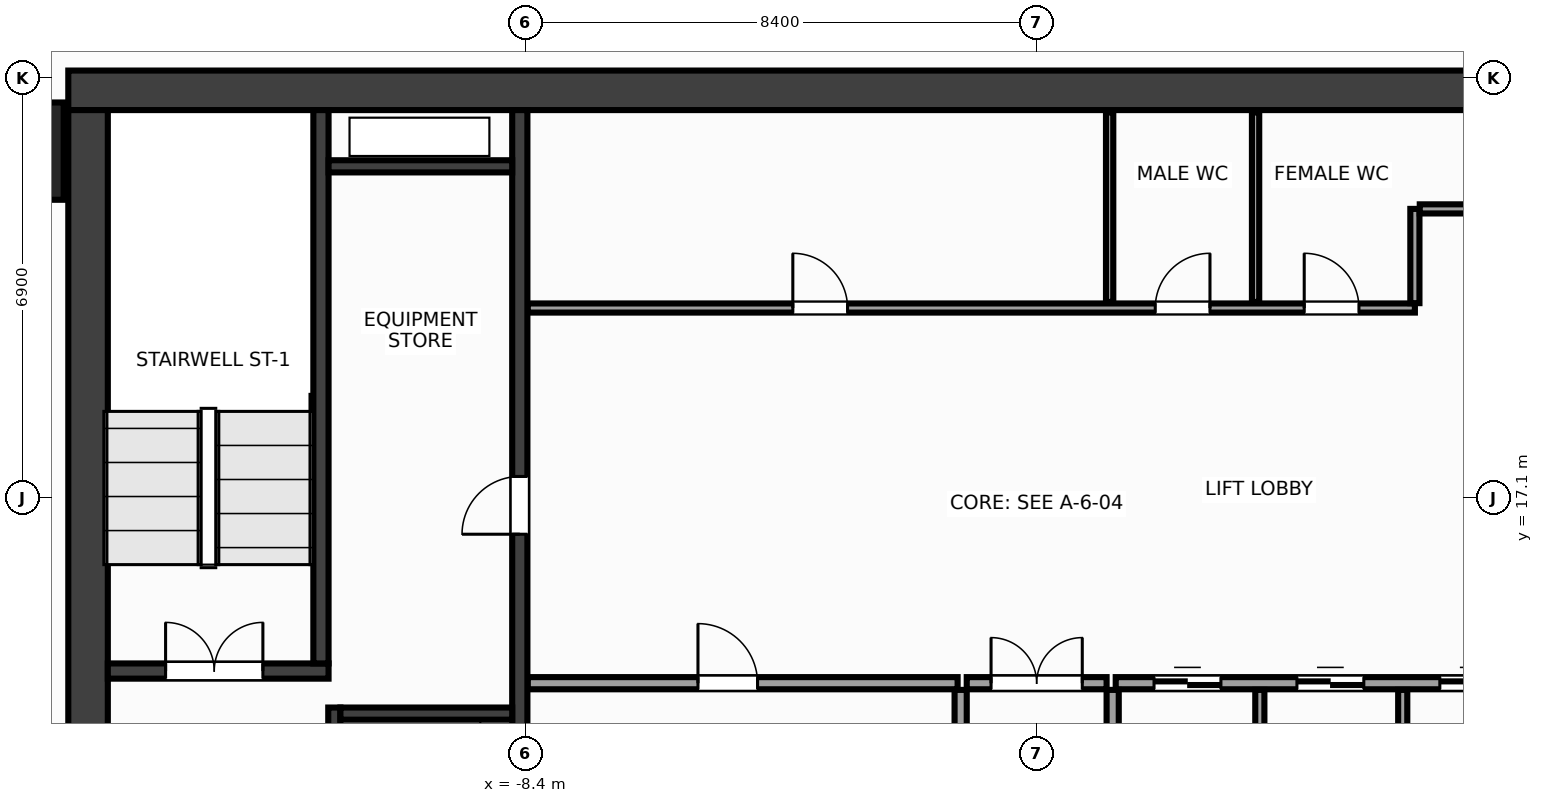
"""IFC4 building model, lengths in metres.
Left out: names, types, materials, properties, quantities, classifications, styles, units other than length and angle.
Written with IfcOpenShell. Run it as: python <this file> out.ifc"""

import sys

from ifc_helpers import new_model, si_unit, direction, frame, frame_2d, origin, origin_2d, place, context, subcontext, project, spatial, rectangle, extrude, source, transform, mapped, element, fill, save


model = new_model("IFC4")
c1 = context("Model", 3, precision=1e-05, world=origin(), true_north=direction((0.0, 1.0)))
c2 = subcontext(c1, "Body", "Model", "MODEL_VIEW")
j1 = project(units=[si_unit("LENGTHUNIT", "METRE"), si_unit("PLANEANGLEUNIT", "RADIAN")], contexts=[c1])
p1 = place(None, origin())
s1 = spatial("IfcSite", under=j1, at=p1, CompositionType="ELEMENT")
p2 = place(p1, origin())
s2 = spatial("IfcBuilding", under=s1, at=p2, CompositionType="ELEMENT")
p3 = place(p2, frame((0.0, 0.0, 84.8)))
s3 = spatial("IfcBuildingStorey", under=s2, at=p3, CompositionType="ELEMENT", Elevation=84.8)
m1 = source(origin(), c2, "Body", "SweptSolid", [
    extrude(rectangle(XDim=31.85, YDim=0.65, at=frame_2d((15.925, 0.0))), origin(), (0.0, 0.0, 1.0), 3.6),
])
p4 = place(p3, frame((-15.925, 23.8, 0.0), z_axis=(0.0, 0.0, 1.0), x_axis=(1.0, 0.0, 0.0)))
e1 = element("IfcWall", 1, at=p4, inside=s3, PredefinedType="SHEAR", context=c2, shape_type="MappedRepresentation", body=[
    mapped(m1, transform((0.0, 0.0, 0.0), x_axis=(1.0, 0.0, 0.0), y_axis=(0.0, 1.0, 0.0), z_axis=(0.0, 0.0, 1.0), scale=1.0)),
])
m2 = source(origin(), c2, "Body", "SweptSolid", [
    extrude(rectangle(XDim=12.95, YDim=0.65, at=frame_2d((6.475, 0.0))), origin(), (0.0, 0.0, 1.0), 3.6),
])
p5 = place(p3, frame((-15.6, 10.525, 0.0), z_axis=(0.0, 0.0, 1.0), x_axis=(0.0, 1.0, 0.0)))
e2 = element("IfcWall", 2, at=p5, inside=s3, PredefinedType="SHEAR", context=c2, shape_type="MappedRepresentation", body=[
    mapped(m2, transform((0.0, 0.0, 0.0), x_axis=(1.0, 0.0, 0.0), y_axis=(0.0, 1.0, 0.0), z_axis=(0.0, 0.0, 1.0), scale=1.0)),
])
m3 = source(origin(), c2, "Body", "SweptSolid", [
    extrude(rectangle(XDim=12.95, YDim=0.25, at=frame_2d((6.475, 0.0))), origin(), (0.0, 0.0, 1.0), 3.6),
])
p6 = place(p3, frame((-8.5, 10.525, 0.0), z_axis=(0.0, 0.0, 1.0), x_axis=(0.0, 1.0, 0.0)))
e3 = element("IfcWall", 3, at=p6, inside=s3, PredefinedType="SHEAR", context=c2, shape_type="MappedRepresentation", body=[
    mapped(m3, transform((0.0, 0.0, 0.0), x_axis=(1.0, 0.0, 0.0), y_axis=(0.0, 1.0, 0.0), z_axis=(0.0, 0.0, 1.0), scale=1.0)),
])
p7 = place(p6, frame((5.975, 0.0, 0.0)))
e4 = element("IfcOpeningElement", 4, at=p7, cuts=e3, PredefinedType="OPENING", context=c2, shape_type="SweptSolid", body=[
    extrude(rectangle(XDim=0.95, YDim=2.15, at=frame_2d((0.475, 1.075))), frame((0.0, 0.137, 0.0), z_axis=(0.0, -1.0, 0.0), x_axis=(1.0, 0.0, 0.0)), (0.0, 0.0, 1.0), 0.274),
])
m4 = source(origin(), c2, "Body", "SweptSolid", [
    extrude(rectangle(XDim=3.63, YDim=0.25, at=frame_2d((1.815, 0.0))), origin(), (0.0, 0.0, 1.0), 3.6),
])
p8 = place(p3, frame((-15.275, 14.25, 0.0), z_axis=(0.0, 0.0, 1.0), x_axis=(1.0, 0.0, 0.0)))
e5 = element("IfcWall", 5, at=p8, inside=s3, PredefinedType="SHEAR", context=c2, shape_type="MappedRepresentation", body=[
    mapped(m4, transform((0.0, 0.0, 0.0), x_axis=(1.0, 0.0, 0.0), y_axis=(0.0, 1.0, 0.0), z_axis=(0.0, 0.0, 1.0), scale=1.0)),
])
p9 = place(p8, frame((0.95, 0.0, 0.0)))
e6 = element("IfcOpeningElement", 6, at=p9, cuts=e5, PredefinedType="OPENING", context=c2, shape_type="SweptSolid", body=[
    extrude(rectangle(XDim=1.6, YDim=2.15, at=frame_2d((0.8, 1.075))), frame((0.0, 0.137, 0.0), z_axis=(0.0, -1.0, 0.0), x_axis=(1.0, 0.0, 0.0)), (0.0, 0.0, 1.0), 0.274),
])
m5 = source(origin(), c2, "Body", "SweptSolid", [
    extrude(rectangle(XDim=9.1, YDim=0.25, at=frame_2d((4.55, 0.0))), origin(), (0.0, 0.0, 1.0), 3.6),
])
p10 = place(p3, frame((-11.77, 14.375, 0.0), z_axis=(0.0, 0.0, 1.0), x_axis=(0.0, 1.0, 0.0)))
e7 = element("IfcWall", 7, at=p10, inside=s3, PredefinedType="SHEAR", context=c2, shape_type="MappedRepresentation", body=[
    mapped(m5, transform((0.0, 0.0, 0.0), x_axis=(1.0, 0.0, 0.0), y_axis=(0.0, 1.0, 0.0), z_axis=(0.0, 0.0, 1.0), scale=1.0)),
])
m6 = source(origin(), c2, "Body", "SweptSolid", [
    extrude(rectangle(XDim=3.125, YDim=0.2, at=frame_2d((1.562, 0.0))), origin(), (0.0, 0.0, 1.0), 3.6),
])
p11 = place(p3, frame((-11.55, 10.525, 0.0), z_axis=(0.0, 0.0, 1.0), x_axis=(0.0, 1.0, 0.0)))
e8 = element("IfcWall", 8, at=p11, inside=s3, PredefinedType="SHEAR", context=c2, shape_type="MappedRepresentation", body=[
    mapped(m6, transform((0.0, 0.0, 0.0), x_axis=(1.0, 0.0, 0.0), y_axis=(0.0, 1.0, 0.0), z_axis=(0.0, 0.0, 1.0), scale=1.0)),
])
p12 = place(p11, frame((0.9, 0.0, 0.0)))
e9 = element("IfcOpeningElement", 9, at=p12, cuts=e8, PredefinedType="OPENING", context=c2, shape_type="SweptSolid", body=[
    extrude(rectangle(XDim=1.1, YDim=2.15, at=frame_2d((0.55, 1.075))), frame((0.0, 0.112, 0.0), z_axis=(0.0, -1.0, 0.0), x_axis=(1.0, 0.0, 0.0)), (0.0, 0.0, 1.0), 0.224),
])
m7 = source(origin(), c2, "Body", "SweptSolid", [
    extrude(rectangle(XDim=2.825, YDim=0.2, at=frame_2d((1.413, 0.0))), origin(), (0.0, 0.0, 1.0), 3.6),
])
p13 = place(p3, frame((-11.45, 13.55, 0.0), z_axis=(0.0, 0.0, 1.0), x_axis=(1.0, 0.0, 0.0)))
e10 = element("IfcWall", 10, at=p13, inside=s3, PredefinedType="SHEAR", context=c2, shape_type="MappedRepresentation", body=[
    mapped(m7, transform((0.0, 0.0, 0.0), x_axis=(1.0, 0.0, 0.0), y_axis=(0.0, 1.0, 0.0), z_axis=(0.0, 0.0, 1.0), scale=1.0)),
])
m8 = source(origin(), c2, "Body", "SweptSolid", [
    extrude(rectangle(XDim=3.02, YDim=0.2, at=frame_2d((1.51, 0.0))), origin(), (0.0, 0.0, 1.0), 3.6),
])
p14 = place(p3, frame((-11.645, 22.55, 0.0), z_axis=(0.0, 0.0, 1.0), x_axis=(1.0, 0.0, 0.0)))
e11 = element("IfcWall", 11, at=p14, inside=s3, PredefinedType="SHEAR", context=c2, shape_type="MappedRepresentation", body=[
    mapped(m8, transform((0.0, 0.0, 0.0), x_axis=(1.0, 0.0, 0.0), y_axis=(0.0, 1.0, 0.0), z_axis=(0.0, 0.0, 1.0), scale=1.0)),
])
m9 = source(origin(), c2, "Body", "SweptSolid", [
    extrude(rectangle(XDim=1.6, YDim=1.6, at=origin_2d()), origin(), (0.0, 0.0, 1.0), 3.6),
])
p15 = place(p3, frame((-16.8, 22.8, 0.0), z_axis=(0.0, 0.0, 1.0), x_axis=(1.0, 0.0, 0.0)))
e12 = element("IfcColumn", 12, at=p15, inside=s3, PredefinedType="COLUMN", context=c2, shape_type="MappedRepresentation", body=[
    mapped(m9, transform((0.0, 0.0, 0.0), x_axis=(1.0, 0.0, 0.0), y_axis=(0.0, 1.0, 0.0), z_axis=(0.0, 0.0, 1.0), scale=1.0)),
])
m10 = source(origin(), c2, "Body", "SweptSolid", [
    extrude(rectangle(XDim=7.07, YDim=0.2, at=frame_2d((3.535, 0.0))), origin(), (0.0, 0.0, 1.0), 3.36),
])
p16 = place(p3, frame((-8.37, 14.05, 0.0), z_axis=(0.0, 0.0, 1.0), x_axis=(1.0, 0.0, 0.0)))
e13 = element("IfcWall", 13, at=p16, inside=s3, PredefinedType="PARTITIONING", context=c2, shape_type="MappedRepresentation", body=[
    mapped(m10, transform((0.0, 0.0, 0.0), x_axis=(1.0, 0.0, 0.0), y_axis=(0.0, 1.0, 0.0), z_axis=(0.0, 0.0, 1.0), scale=1.0)),
])
p17 = place(p16, frame((2.8, 0.0, 0.0)))
e14 = element("IfcOpeningElement", 14, at=p17, cuts=e13, PredefinedType="OPENING", context=c2, shape_type="SweptSolid", body=[
    extrude(rectangle(XDim=0.98, YDim=2.15, at=frame_2d((0.49, 1.075))), frame((0.0, 0.112, 0.0), z_axis=(0.0, -1.0, 0.0), x_axis=(1.0, 0.0, 0.0)), (0.0, 0.0, 1.0), 0.224),
])
p18 = place(p3, frame((1.3, 14.05, 0.0), z_axis=(0.0, 0.0, 1.0), x_axis=(1.0, 0.0, 0.0)))
e15 = element("IfcWall", 15, at=p18, inside=s3, PredefinedType="PARTITIONING", context=c2, shape_type="MappedRepresentation", body=[
    mapped(m10, transform((0.0, 0.0, 0.0), x_axis=(1.0, 0.0, 0.0), y_axis=(0.0, 1.0, 0.0), z_axis=(0.0, 0.0, 1.0), scale=1.0)),
])
p19 = place(p18, frame((0.63, 0.0, 0.0)))
e16 = element("IfcOpeningElement", 16, at=p19, cuts=e15, PredefinedType="OPENING", context=c2, shape_type="SweptSolid", body=[
    extrude(rectangle(XDim=1.1, YDim=2.15, at=frame_2d((0.55, 1.075))), frame((0.0, 0.112, 0.0), z_axis=(0.0, -1.0, 0.0), x_axis=(1.0, 0.0, 0.0)), (0.0, 0.0, 1.0), 0.224),
])
p20 = place(p18, frame((2.98, 0.0, 0.0)))
e17 = element("IfcOpeningElement", 17, at=p20, cuts=e15, PredefinedType="OPENING", context=c2, shape_type="SweptSolid", body=[
    extrude(rectangle(XDim=1.1, YDim=2.15, at=frame_2d((0.55, 1.075))), frame((0.0, 0.112, 0.0), z_axis=(0.0, -1.0, 0.0), x_axis=(1.0, 0.0, 0.0)), (0.0, 0.0, 1.0), 0.224),
])
p21 = place(p18, frame((5.33, 0.0, 0.0)))
e18 = element("IfcOpeningElement", 18, at=p21, cuts=e15, PredefinedType="OPENING", context=c2, shape_type="SweptSolid", body=[
    extrude(rectangle(XDim=1.1, YDim=2.15, at=frame_2d((0.55, 1.075))), frame((0.0, 0.112, 0.0), z_axis=(0.0, -1.0, 0.0), x_axis=(1.0, 0.0, 0.0)), (0.0, 0.0, 1.0), 0.224),
])
m11 = source(origin(), c2, "Body", "SweptSolid", [
    extrude(rectangle(XDim=3.415, YDim=0.2, at=frame_2d((1.708, 0.0))), origin(), (0.0, 0.0, 1.0), 3.36),
])
for number, where, z_axis, x_axis in (
    (19, (-1.25, 10.525, 0.0), (0.0, 0.0, 1.0), (0.0, 1.0, 0.0)),
    (20, (1.25, 10.525, 0.0), (0.0, 0.0, 1.0), (0.0, 1.0, 0.0)),
):
    element("IfcWall", number, at=place(p3, frame(where, z_axis=z_axis, x_axis=x_axis)), inside=s3, PredefinedType="PARTITIONING", context=c2, shape_type="MappedRepresentation", body=[
        mapped(m11, transform((0.0, 0.0, 0.0), x_axis=(1.0, 0.0, 0.0), y_axis=(0.0, 1.0, 0.0), z_axis=(0.0, 0.0, 1.0), scale=1.0)),
    ])
m12 = source(origin(), c2, "Body", "SweptSolid", [
    extrude(rectangle(XDim=2.3, YDim=0.2, at=frame_2d((1.15, 0.0))), origin(), (0.0, 0.0, 1.0), 3.36),
])
p22 = place(p3, frame((-1.15, 14.05, 0.0), z_axis=(0.0, 0.0, 1.0), x_axis=(1.0, 0.0, 0.0)))
e21 = element("IfcWall", 21, at=p22, inside=s3, PredefinedType="PARTITIONING", context=c2, shape_type="MappedRepresentation", body=[
    mapped(m12, transform((0.0, 0.0, 0.0), x_axis=(1.0, 0.0, 0.0), y_axis=(0.0, 1.0, 0.0), z_axis=(0.0, 0.0, 1.0), scale=1.0)),
])
p23 = place(p22, frame((0.4, 0.0, 0.0)))
e22 = element("IfcOpeningElement", 22, at=p23, cuts=e21, PredefinedType="OPENING", context=c2, shape_type="SweptSolid", body=[
    extrude(rectangle(XDim=1.5, YDim=2.2, at=frame_2d((0.75, 1.1))), frame((0.0, 0.112, 0.0), z_axis=(0.0, -1.0, 0.0), x_axis=(1.0, 0.0, 0.0)), (0.0, 0.0, 1.0), 0.224),
])
m13 = source(origin(), c2, "Body", "SweptSolid", [
    extrude(rectangle(XDim=14.59, YDim=0.15, at=frame_2d((7.295, 0.0))), origin(), (0.0, 0.0, 1.0), 3.36),
])
p24 = place(p3, frame((-8.37, 20.22, 0.0), z_axis=(0.0, 0.0, 1.0), x_axis=(1.0, 0.0, 0.0)))
e23 = element("IfcWall", 23, at=p24, inside=s3, PredefinedType="PARTITIONING", context=c2, shape_type="MappedRepresentation", body=[
    mapped(m13, transform((0.0, 0.0, 0.0), x_axis=(1.0, 0.0, 0.0), y_axis=(0.0, 1.0, 0.0), z_axis=(0.0, 0.0, 1.0), scale=1.0)),
])
p25 = place(p24, frame((4.36, 0.0, 0.0)))
e24 = element("IfcOpeningElement", 24, at=p25, cuts=e23, PredefinedType="OPENING", context=c2, shape_type="SweptSolid", body=[
    extrude(rectangle(XDim=0.9, YDim=2.15, at=frame_2d((0.45, 1.075))), frame((0.0, 0.087, 0.0), z_axis=(0.0, -1.0, 0.0), x_axis=(1.0, 0.0, 0.0)), (0.0, 0.0, 1.0), 0.174),
])
p26 = place(p24, frame((10.32, 0.0, 0.0)))
e25 = element("IfcOpeningElement", 25, at=p26, cuts=e23, PredefinedType="OPENING", context=c2, shape_type="SweptSolid", body=[
    extrude(rectangle(XDim=0.9, YDim=2.15, at=frame_2d((0.45, 1.075))), frame((0.0, 0.087, 0.0), z_axis=(0.0, -1.0, 0.0), x_axis=(1.0, 0.0, 0.0)), (0.0, 0.0, 1.0), 0.174),
])
p27 = place(p24, frame((12.77, 0.0, 0.0)))
e26 = element("IfcOpeningElement", 26, at=p27, cuts=e23, PredefinedType="OPENING", context=c2, shape_type="SweptSolid", body=[
    extrude(rectangle(XDim=0.9, YDim=2.15, at=frame_2d((0.45, 1.075))), frame((0.0, 0.087, 0.0), z_axis=(0.0, -1.0, 0.0), x_axis=(1.0, 0.0, 0.0)), (0.0, 0.0, 1.0), 0.174),
])
m14 = source(origin(), c2, "Body", "SweptSolid", [
    extrude(rectangle(XDim=1.55, YDim=0.15, at=frame_2d((0.775, 0.0))), origin(), (0.0, 0.0, 1.0), 3.36),
])
p28 = place(p3, frame((6.22, 20.3, 0.0), z_axis=(0.0, 0.0, 1.0), x_axis=(0.0, 1.0, 0.0)))
e27 = element("IfcWall", 27, at=p28, inside=s3, PredefinedType="PARTITIONING", context=c2, shape_type="MappedRepresentation", body=[
    mapped(m14, transform((0.0, 0.0, 0.0), x_axis=(1.0, 0.0, 0.0), y_axis=(0.0, 1.0, 0.0), z_axis=(0.0, 0.0, 1.0), scale=1.0)),
])
m15 = source(origin(), c2, "Body", "SweptSolid", [
    extrude(rectangle(XDim=2.07, YDim=0.15, at=frame_2d((1.035, 0.0))), origin(), (0.0, 0.0, 1.0), 3.36),
])
p29 = place(p3, frame((6.3, 21.85, 0.0), z_axis=(0.0, 0.0, 1.0), x_axis=(1.0, 0.0, 0.0)))
e28 = element("IfcWall", 28, at=p29, inside=s3, PredefinedType="PARTITIONING", context=c2, shape_type="MappedRepresentation", body=[
    mapped(m15, transform((0.0, 0.0, 0.0), x_axis=(1.0, 0.0, 0.0), y_axis=(0.0, 1.0, 0.0), z_axis=(0.0, 0.0, 1.0), scale=1.0)),
])
m16 = source(origin(), c2, "Body", "SweptSolid", [
    extrude(rectangle(XDim=3.415, YDim=0.15, at=frame_2d((1.708, 0.0))), origin(), (0.0, 0.0, 1.0), 3.36),
])
for number, where, z_axis, x_axis in (
    (29, (3.67, 10.525, 0.0), (0.0, 0.0, 1.0), (0.0, 1.0, 0.0)),
    (30, (6.02, 10.525, 0.0), (0.0, 0.0, 1.0), (0.0, 1.0, 0.0)),
):
    element("IfcWall", number, at=place(p3, frame(where, z_axis=z_axis, x_axis=x_axis)), inside=s3, PredefinedType="PARTITIONING", context=c2, shape_type="MappedRepresentation", body=[
        mapped(m16, transform((0.0, 0.0, 0.0), x_axis=(1.0, 0.0, 0.0), y_axis=(0.0, 1.0, 0.0), z_axis=(0.0, 0.0, 1.0), scale=1.0)),
    ])
m17 = source(origin(), c2, "Body", "SweptSolid", [
    extrude(rectangle(XDim=3.115, YDim=0.12, at=frame_2d((1.558, 0.0))), origin(), (0.0, 0.0, 1.0), 3.36),
])
for number, where, z_axis, x_axis in (
    (31, (1.2, 20.32, 0.0), (0.0, 0.0, 1.0), (0.0, 1.0, 0.0)),
    (32, (3.6, 20.32, 0.0), (0.0, 0.0, 1.0), (0.0, 1.0, 0.0)),
):
    element("IfcWall", number, at=place(p3, frame(where, z_axis=z_axis, x_axis=x_axis)), inside=s3, PredefinedType="PARTITIONING", context=c2, shape_type="MappedRepresentation", body=[
        mapped(m17, transform((0.0, 0.0, 0.0), x_axis=(1.0, 0.0, 0.0), y_axis=(0.0, 1.0, 0.0), z_axis=(0.0, 0.0, 1.0), scale=1.0)),
    ])
m18 = source(origin(), c2, "Body", "SweptSolid", [
    extrude(rectangle(XDim=1.6, YDim=2.15, at=frame_2d((0.8, 1.075))), frame((0.0, 0.025, 0.0), z_axis=(0.0, -1.0, 0.0), x_axis=(1.0, 0.0, 0.0)), (0.0, 0.0, 1.0), 0.05),
])
p30 = place(p9, origin())
e33 = element("IfcDoor", 33, at=p30, inside=s3, OperationType="DOUBLE_DOOR_SINGLE_SWING", PredefinedType="DOOR", context=c2, shape_type="MappedRepresentation", body=[
    mapped(m18, transform((0.0, 0.0, 0.0), x_axis=(1.0, 0.0, 0.0), y_axis=(0.0, 1.0, 0.0), z_axis=(0.0, 0.0, 1.0), scale=1.0)),
])
fill(e6, e33)
m19 = source(origin(), c2, "Body", "SweptSolid", [
    extrude(rectangle(XDim=0.95, YDim=2.15, at=frame_2d((0.475, 1.075))), frame((0.0, 0.025, 0.0), z_axis=(0.0, -1.0, 0.0), x_axis=(1.0, 0.0, 0.0)), (0.0, 0.0, 1.0), 0.05),
])
p31 = place(p7, origin())
e34 = element("IfcDoor", 34, at=p31, inside=s3, OperationType="SINGLE_SWING_LEFT", PredefinedType="DOOR", context=c2, shape_type="MappedRepresentation", body=[
    mapped(m19, transform((0.0, 0.0, 0.0), x_axis=(1.0, 0.0, 0.0), y_axis=(0.0, 1.0, 0.0), z_axis=(0.0, 0.0, 1.0), scale=1.0)),
])
fill(e4, e34)
m20 = source(origin(), c2, "Body", "SweptSolid", [
    extrude(rectangle(XDim=0.98, YDim=2.15, at=frame_2d((0.49, 1.075))), frame((0.0, 0.025, 0.0), z_axis=(0.0, -1.0, 0.0), x_axis=(1.0, 0.0, 0.0)), (0.0, 0.0, 1.0), 0.05),
])
p32 = place(p17, origin())
e35 = element("IfcDoor", 35, at=p32, inside=s3, OperationType="SINGLE_SWING_LEFT", PredefinedType="DOOR", context=c2, shape_type="MappedRepresentation", body=[
    mapped(m20, transform((0.0, 0.0, 0.0), x_axis=(1.0, 0.0, 0.0), y_axis=(0.0, 1.0, 0.0), z_axis=(0.0, 0.0, 1.0), scale=1.0)),
])
fill(e14, e35)
m21 = source(origin(), c2, "Body", "SweptSolid", [
    extrude(rectangle(XDim=1.1, YDim=2.15, at=frame_2d((0.55, 1.075))), frame((0.0, 0.025, 0.0), z_axis=(0.0, -1.0, 0.0), x_axis=(1.0, 0.0, 0.0)), (0.0, 0.0, 1.0), 0.05),
])
p33 = place(p19, origin())
e36 = element("IfcDoor", 36, at=p33, inside=s3, OperationType="DOUBLE_DOOR_SLIDING", PredefinedType="DOOR", context=c2, shape_type="MappedRepresentation", body=[
    mapped(m21, transform((0.0, 0.0, 0.0), x_axis=(1.0, 0.0, 0.0), y_axis=(0.0, 1.0, 0.0), z_axis=(0.0, 0.0, 1.0), scale=1.0)),
])
fill(e16, e36)
p34 = place(p20, origin())
e37 = element("IfcDoor", 37, at=p34, inside=s3, OperationType="DOUBLE_DOOR_SLIDING", PredefinedType="DOOR", context=c2, shape_type="MappedRepresentation", body=[
    mapped(m21, transform((0.0, 0.0, 0.0), x_axis=(1.0, 0.0, 0.0), y_axis=(0.0, 1.0, 0.0), z_axis=(0.0, 0.0, 1.0), scale=1.0)),
])
fill(e17, e37)
p35 = place(p21, origin())
e38 = element("IfcDoor", 38, at=p35, inside=s3, OperationType="DOUBLE_DOOR_SLIDING", PredefinedType="DOOR", context=c2, shape_type="MappedRepresentation", body=[
    mapped(m21, transform((0.0, 0.0, 0.0), x_axis=(1.0, 0.0, 0.0), y_axis=(0.0, 1.0, 0.0), z_axis=(0.0, 0.0, 1.0), scale=1.0)),
])
fill(e18, e38)
m22 = source(origin(), c2, "Body", "SweptSolid", [
    extrude(rectangle(XDim=1.5, YDim=2.2, at=frame_2d((0.75, 1.1))), frame((0.0, 0.025, 0.0), z_axis=(0.0, -1.0, 0.0), x_axis=(1.0, 0.0, 0.0)), (0.0, 0.0, 1.0), 0.05),
])
p36 = place(p23, origin())
e39 = element("IfcDoor", 39, at=p36, inside=s3, OperationType="DOUBLE_DOOR_SINGLE_SWING", PredefinedType="DOOR", context=c2, shape_type="MappedRepresentation", body=[
    mapped(m22, transform((0.0, 0.0, 0.0), x_axis=(1.0, 0.0, 0.0), y_axis=(0.0, 1.0, 0.0), z_axis=(0.0, 0.0, 1.0), scale=1.0)),
])
fill(e22, e39)
m23 = source(origin(), c2, "Body", "SweptSolid", [
    extrude(rectangle(XDim=0.9, YDim=2.15, at=frame_2d((0.45, 1.075))), frame((0.0, 0.025, 0.0), z_axis=(0.0, -1.0, 0.0), x_axis=(1.0, 0.0, 0.0)), (0.0, 0.0, 1.0), 0.05),
])
p37 = place(p25, origin())
e40 = element("IfcDoor", 40, at=p37, inside=s3, OperationType="SINGLE_SWING_LEFT", PredefinedType="DOOR", context=c2, shape_type="MappedRepresentation", body=[
    mapped(m23, transform((0.0, 0.0, 0.0), x_axis=(1.0, 0.0, 0.0), y_axis=(0.0, 1.0, 0.0), z_axis=(0.0, 0.0, 1.0), scale=1.0)),
])
fill(e24, e40)
p38 = place(p26, origin())
e41 = element("IfcDoor", 41, at=p38, inside=s3, OperationType="SINGLE_SWING_RIGHT", PredefinedType="DOOR", context=c2, shape_type="MappedRepresentation", body=[
    mapped(m23, transform((0.0, 0.0, 0.0), x_axis=(1.0, 0.0, 0.0), y_axis=(0.0, 1.0, 0.0), z_axis=(0.0, 0.0, 1.0), scale=1.0)),
])
fill(e25, e41)
p39 = place(p27, origin())
e42 = element("IfcDoor", 42, at=p39, inside=s3, OperationType="SINGLE_SWING_LEFT", PredefinedType="DOOR", context=c2, shape_type="MappedRepresentation", body=[
    mapped(m23, transform((0.0, 0.0, 0.0), x_axis=(1.0, 0.0, 0.0), y_axis=(0.0, 1.0, 0.0), z_axis=(0.0, 0.0, 1.0), scale=1.0)),
])
fill(e26, e42)
save(model, sys.argv[1])
